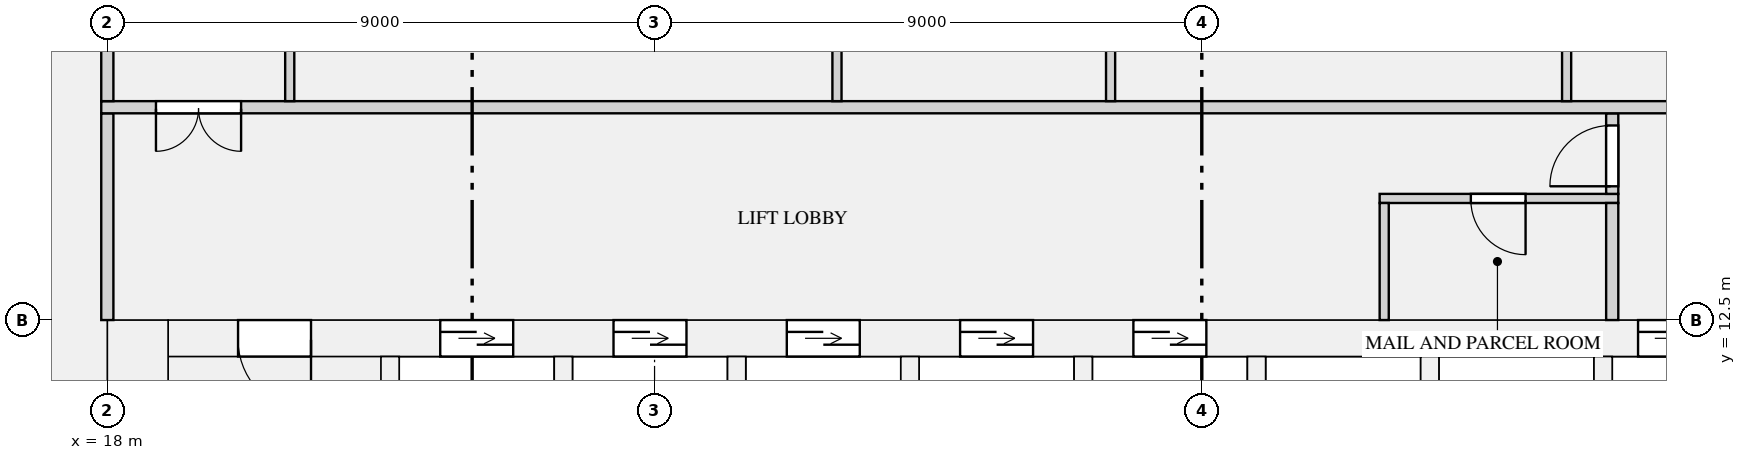
"""IFC4 building model, lengths in metres.
Left out: names, types, materials, properties, quantities, classifications, styles, units other than length and angle.
Written with IfcOpenShell. Run it as: python <this file> out.ifc"""

import sys

from ifc_helpers import new_model, si_unit, direction, frame, frame_2d, origin, place, context, subcontext, project, spatial, rectangle, extrude, element, fill, save


model = new_model("IFC4")
c1 = context("Model", 3, precision=1e-05, world=origin(), true_north=direction((0.0, 1.0)))
c2 = subcontext(c1, "Body", "Model", "MODEL_VIEW")
j1 = project(units=[si_unit("LENGTHUNIT", "METRE"), si_unit("PLANEANGLEUNIT", "RADIAN")], contexts=[c1])
p1 = place(None, origin())
s1 = spatial("IfcSite", under=j1, at=p1, CompositionType="ELEMENT")
p2 = place(p1, origin())
s2 = spatial("IfcBuilding", under=s1, at=p2, CompositionType="ELEMENT")
p3 = place(p2, frame((0.0, 0.0, 66.75)))
s3 = spatial("IfcBuildingStorey", under=s2, at=p3, CompositionType="ELEMENT", Elevation=66.75)
p4 = place(p3, frame((18.5, 0.0, 0.0), z_axis=(0.0, 0.0, 1.0), x_axis=(0.0, 1.0, 0.0)))
e1 = element("IfcWall", 1, at=p4, inside=s3, PredefinedType="SHEAR", context=c2, shape_type="SweptSolid", body=[
    extrude(rectangle(XDim=12.5, YDim=1.0, at=frame_2d((6.25, 0.0))), origin(), (0.0, 0.0, 1.0), 3.15),
])
p5 = place(p3, frame((19.0, 12.2, 0.0), z_axis=(0.0, 0.0, 1.0), x_axis=(1.0, 0.0, 0.0)))
e2 = element("IfcWall", 2, at=p5, inside=s3, PredefinedType="SHEAR", context=c2, shape_type="SweptSolid", body=[
    extrude(rectangle(XDim=34.0, YDim=0.6, at=frame_2d((17.0, 0.0))), origin(), (0.0, 0.0, 1.0), 3.15),
])
p6 = place(p5, frame((4.475, 0.0, 0.0)))
e3 = element("IfcOpeningElement", 3, at=p6, cuts=e2, PredefinedType="OPENING", context=c2, shape_type="SweptSolid", body=[
    extrude(rectangle(XDim=1.2, YDim=2.1, at=frame_2d((0.6, 1.05))), frame((0.0, 0.31, 0.0), z_axis=(0.0, -1.0, 0.0), x_axis=(1.0, 0.0, 0.0)), (0.0, 0.0, 1.0), 0.62),
])
p7 = place(p5, frame((7.325, 0.0, 0.0)))
e4 = element("IfcOpeningElement", 4, at=p7, cuts=e2, PredefinedType="OPENING", context=c2, shape_type="SweptSolid", body=[
    extrude(rectangle(XDim=1.2, YDim=2.1, at=frame_2d((0.6, 1.05))), frame((0.0, 0.31, 0.0), z_axis=(0.0, -1.0, 0.0), x_axis=(1.0, 0.0, 0.0)), (0.0, 0.0, 1.0), 0.62),
])
p8 = place(p5, frame((10.175, 0.0, 0.0)))
e5 = element("IfcOpeningElement", 5, at=p8, cuts=e2, PredefinedType="OPENING", context=c2, shape_type="SweptSolid", body=[
    extrude(rectangle(XDim=1.2, YDim=2.1, at=frame_2d((0.6, 1.05))), frame((0.0, 0.31, 0.0), z_axis=(0.0, -1.0, 0.0), x_axis=(1.0, 0.0, 0.0)), (0.0, 0.0, 1.0), 0.62),
])
p9 = place(p5, frame((13.025, 0.0, 0.0)))
e6 = element("IfcOpeningElement", 6, at=p9, cuts=e2, PredefinedType="OPENING", context=c2, shape_type="SweptSolid", body=[
    extrude(rectangle(XDim=1.2, YDim=2.1, at=frame_2d((0.6, 1.05))), frame((0.0, 0.31, 0.0), z_axis=(0.0, -1.0, 0.0), x_axis=(1.0, 0.0, 0.0)), (0.0, 0.0, 1.0), 0.62),
])
p10 = place(p5, frame((15.875, 0.0, 0.0)))
e7 = element("IfcOpeningElement", 7, at=p10, cuts=e2, PredefinedType="OPENING", context=c2, shape_type="SweptSolid", body=[
    extrude(rectangle(XDim=1.2, YDim=2.1, at=frame_2d((0.6, 1.05))), frame((0.0, 0.31, 0.0), z_axis=(0.0, -1.0, 0.0), x_axis=(1.0, 0.0, 0.0)), (0.0, 0.0, 1.0), 0.62),
])
p11 = place(p5, frame((24.175, 0.0, 0.0)))
e8 = element("IfcOpeningElement", 8, at=p11, cuts=e2, PredefinedType="OPENING", context=c2, shape_type="SweptSolid", body=[
    extrude(rectangle(XDim=1.1, YDim=2.1, at=frame_2d((0.55, 1.05))), frame((0.0, 0.31, 0.0), z_axis=(0.0, -1.0, 0.0), x_axis=(1.0, 0.0, 0.0)), (0.0, 0.0, 1.0), 0.62),
])
p12 = place(p5, frame((26.425, 0.0, 0.0)))
e9 = element("IfcOpeningElement", 9, at=p12, cuts=e2, PredefinedType="OPENING", context=c2, shape_type="SweptSolid", body=[
    extrude(rectangle(XDim=1.1, YDim=2.1, at=frame_2d((0.55, 1.05))), frame((0.0, 0.31, 0.0), z_axis=(0.0, -1.0, 0.0), x_axis=(1.0, 0.0, 0.0)), (0.0, 0.0, 1.0), 0.62),
])
p13 = place(p5, frame((28.675, 0.0, 0.0)))
e10 = element("IfcOpeningElement", 10, at=p13, cuts=e2, PredefinedType="OPENING", context=c2, shape_type="SweptSolid", body=[
    extrude(rectangle(XDim=1.1, YDim=2.1, at=frame_2d((0.55, 1.05))), frame((0.0, 0.31, 0.0), z_axis=(0.0, -1.0, 0.0), x_axis=(1.0, 0.0, 0.0)), (0.0, 0.0, 1.0), 0.62),
])
p14 = place(p5, frame((1.15, 0.0, 0.0)))
e11 = element("IfcOpeningElement", 11, at=p14, cuts=e2, PredefinedType="OPENING", context=c2, shape_type="SweptSolid", body=[
    extrude(rectangle(XDim=1.2, YDim=2.1, at=frame_2d((0.6, 1.05))), frame((0.0, 0.31, 0.0), z_axis=(0.0, -1.0, 0.0), x_axis=(1.0, 0.0, 0.0)), (0.0, 0.0, 1.0), 0.62),
])
p15 = place(p5, frame((31.65, 0.0, 0.0)))
e12 = element("IfcOpeningElement", 12, at=p15, cuts=e2, PredefinedType="OPENING", context=c2, shape_type="SweptSolid", body=[
    extrude(rectangle(XDim=1.2, YDim=2.1, at=frame_2d((0.6, 1.05))), frame((0.0, 0.31, 0.0), z_axis=(0.0, -1.0, 0.0), x_axis=(1.0, 0.0, 0.0)), (0.0, 0.0, 1.0), 0.62),
])
for number, where, z_axis, x_axis in (
    (13, (22.65, 9.35, 0.0), (0.0, 0.0, 1.0), (0.0, 1.0, 0.0)),
    (14, (25.5, 9.35, 0.0), (0.0, 0.0, 1.0), (0.0, 1.0, 0.0)),
    (15, (28.35, 9.35, 0.0), (0.0, 0.0, 1.0), (0.0, 1.0, 0.0)),
    (16, (31.2, 9.35, 0.0), (0.0, 0.0, 1.0), (0.0, 1.0, 0.0)),
    (17, (34.05, 9.35, 0.0), (0.0, 0.0, 1.0), (0.0, 1.0, 0.0)),
    (18, (36.9, 9.35, 0.0), (0.0, 0.0, 1.0), (0.0, 1.0, 0.0)),
    (19, (39.75, 9.35, 0.0), (0.0, 0.0, 1.0), (0.0, 1.0, 0.0)),
):
    element("IfcWall", number, at=place(p3, frame(where, z_axis=z_axis, x_axis=x_axis)), inside=s3, PredefinedType="SHEAR", context=c2, shape_type="SweptSolid", body=[
        extrude(rectangle(XDim=2.55, YDim=0.3, at=frame_2d((1.275, 0.0))), origin(), (0.0, 0.0, 1.0), 3.15),
    ])
p16 = place(p3, frame((42.6, 8.25, 0.0), z_axis=(0.0, 0.0, 1.0), x_axis=(0.0, 1.0, 0.0)))
e20 = element("IfcWall", 20, at=p16, inside=s3, PredefinedType="SHEAR", context=c2, shape_type="SweptSolid", body=[
    extrude(rectangle(XDim=3.65, YDim=0.3, at=frame_2d((1.825, 0.0))), origin(), (0.0, 0.0, 1.0), 3.15),
])
p17 = place(p3, frame((38.925, 14.5, 0.0), z_axis=(0.0, 0.0, 1.0), x_axis=(1.0, 0.0, 0.0)))
e21 = element("IfcWall", 21, at=p17, inside=s3, PredefinedType="PARTITIONING", context=c2, shape_type="SweptSolid", body=[
    extrude(rectangle(XDim=3.925, YDim=0.15, at=frame_2d((1.962, 0.0))), origin(), (0.0, 0.0, 1.0), 2.83),
])
p18 = place(p17, frame((1.5, 0.0, 0.0)))
e22 = element("IfcOpeningElement", 22, at=p18, cuts=e21, PredefinedType="OPENING", context=c2, shape_type="SweptSolid", body=[
    extrude(rectangle(XDim=0.9, YDim=2.1, at=frame_2d((0.45, 1.05))), frame((0.0, 0.085, 0.0), z_axis=(0.0, -1.0, 0.0), x_axis=(1.0, 0.0, 0.0)), (0.0, 0.0, 1.0), 0.17),
])
p19 = place(p3, frame((18.0, 12.5, 0.0), z_axis=(0.0, 0.0, 1.0), x_axis=(0.0, 1.0, 0.0)))
e23 = element("IfcWall", 23, at=p19, inside=s3, PredefinedType="PARTITIONING", context=c2, shape_type="SweptSolid", body=[
    extrude(rectangle(XDim=3.4, YDim=0.2, at=frame_2d((1.7, 0.0))), origin(), (0.0, 0.0, 1.0), 2.83),
])
p20 = place(p3, frame((39.0, 12.5, 0.0), z_axis=(0.0, 0.0, 1.0), x_axis=(0.0, 1.0, 0.0)))
e24 = element("IfcWall", 24, at=p20, inside=s3, PredefinedType="PARTITIONING", context=c2, shape_type="SweptSolid", body=[
    extrude(rectangle(XDim=1.925, YDim=0.15, at=frame_2d((0.962, 0.0))), origin(), (0.0, 0.0, 1.0), 2.83),
])
p21 = place(p3, frame((42.75, 12.5, 0.0), z_axis=(0.0, 0.0, 1.0), x_axis=(0.0, 1.0, 0.0)))
e25 = element("IfcWall", 25, at=p21, inside=s3, PredefinedType="PARTITIONING", context=c2, shape_type="SweptSolid", body=[
    extrude(rectangle(XDim=1.925, YDim=0.2, at=frame_2d((0.962, 0.0))), origin(), (0.0, 0.0, 1.0), 2.83),
])
p22 = place(p3, frame((42.75, 14.575, 0.0), z_axis=(0.0, 0.0, 1.0), x_axis=(0.0, 1.0, 0.0)))
e26 = element("IfcWall", 26, at=p22, inside=s3, PredefinedType="PARTITIONING", context=c2, shape_type="SweptSolid", body=[
    extrude(rectangle(XDim=1.325, YDim=0.2, at=frame_2d((0.663, 0.0))), origin(), (0.0, 0.0, 1.0), 2.83),
])
p23 = place(p22, frame((0.125, 0.0, 0.0)))
e27 = element("IfcOpeningElement", 27, at=p23, cuts=e26, PredefinedType="OPENING", context=c2, shape_type="SweptSolid", body=[
    extrude(rectangle(XDim=1.0, YDim=2.1, at=frame_2d((0.5, 1.05))), frame((0.0, 0.11, 0.0), z_axis=(0.0, -1.0, 0.0), x_axis=(1.0, 0.0, 0.0)), (0.0, 0.0, 1.0), 0.22),
])
p24 = place(p3, frame((17.9, 16.0, 0.0), z_axis=(0.0, 0.0, 1.0), x_axis=(1.0, 0.0, 0.0)))
e28 = element("IfcWall", 28, at=p24, inside=s3, PredefinedType="PARTITIONING", context=c2, shape_type="SweptSolid", body=[
    extrude(rectangle(XDim=36.2, YDim=0.2, at=frame_2d((18.1, 0.0))), origin(), (0.0, 0.0, 1.0), 2.83),
])
p25 = place(p24, frame((0.9, 0.0, 0.0)))
e29 = element("IfcOpeningElement", 29, at=p25, cuts=e28, PredefinedType="OPENING", context=c2, shape_type="SweptSolid", body=[
    extrude(rectangle(XDim=1.4, YDim=2.1, at=frame_2d((0.7, 1.05))), frame((0.0, 0.11, 0.0), z_axis=(0.0, -1.0, 0.0), x_axis=(1.0, 0.0, 0.0)), (0.0, 0.0, 1.0), 0.22),
])
p26 = place(p24, frame((33.9, 0.0, 0.0)))
e30 = element("IfcOpeningElement", 30, at=p26, cuts=e28, PredefinedType="OPENING", context=c2, shape_type="SweptSolid", body=[
    extrude(rectangle(XDim=1.4, YDim=2.1, at=frame_2d((0.7, 1.05))), frame((0.0, 0.11, 0.0), z_axis=(0.0, -1.0, 0.0), x_axis=(1.0, 0.0, 0.0)), (0.0, 0.0, 1.0), 0.22),
])
p27 = place(p3, frame((18.0, 16.1, 0.0), z_axis=(0.0, 0.0, 1.0), x_axis=(0.0, 1.0, 0.0)))
e31 = element("IfcWall", 31, at=p27, inside=s3, PredefinedType="PARTITIONING", context=c2, shape_type="SweptSolid", body=[
    extrude(rectangle(XDim=7.8, YDim=0.2, at=frame_2d((3.9, 0.0))), origin(), (0.0, 0.0, 1.0), 2.83),
])
p28 = place(p27, frame((2.35, 0.0, 0.0)))
e32 = element("IfcOpeningElement", 32, at=p28, cuts=e31, PredefinedType="OPENING", context=c2, shape_type="SweptSolid", body=[
    extrude(rectangle(XDim=1.1, YDim=2.1, at=frame_2d((0.55, 1.05))), frame((0.0, 0.11, 0.0), z_axis=(0.0, -1.0, 0.0), x_axis=(1.0, 0.0, 0.0)), (0.0, 0.0, 1.0), 0.22),
])
for number, where, z_axis, x_axis in (
    (33, (21.0, 16.1, 0.0), (0.0, 0.0, 1.0), (0.0, 1.0, 0.0)),
    (34, (30.0, 16.1, 0.0), (0.0, 0.0, 1.0), (0.0, 1.0, 0.0)),
    (35, (34.5, 16.1, 0.0), (0.0, 0.0, 1.0), (0.0, 1.0, 0.0)),
    (36, (42.0, 16.1, 0.0), (0.0, 0.0, 1.0), (0.0, 1.0, 0.0)),
):
    element("IfcWall", number, at=place(p3, frame(where, z_axis=z_axis, x_axis=x_axis)), inside=s3, PredefinedType="PARTITIONING", context=c2, shape_type="SweptSolid", body=[
        extrude(rectangle(XDim=4.825, YDim=0.15, at=frame_2d((2.413, 0.0))), origin(), (0.0, 0.0, 1.0), 2.83),
    ])
p29 = place(p6, origin())
e37 = element("IfcDoor", 37, at=p29, inside=s3, OperationType="DOUBLE_DOOR_SLIDING", PredefinedType="DOOR", context=c2, shape_type="SweptSolid", body=[
    extrude(rectangle(XDim=1.2, YDim=2.1, at=frame_2d((0.6, 1.05))), frame((0.0, 0.025, 0.0), z_axis=(0.0, -1.0, 0.0), x_axis=(1.0, 0.0, 0.0)), (0.0, 0.0, 1.0), 0.05),
])
fill(e3, e37)
p30 = place(p7, origin())
e38 = element("IfcDoor", 38, at=p30, inside=s3, OperationType="DOUBLE_DOOR_SLIDING", PredefinedType="DOOR", context=c2, shape_type="SweptSolid", body=[
    extrude(rectangle(XDim=1.2, YDim=2.1, at=frame_2d((0.6, 1.05))), frame((0.0, 0.025, 0.0), z_axis=(0.0, -1.0, 0.0), x_axis=(1.0, 0.0, 0.0)), (0.0, 0.0, 1.0), 0.05),
])
fill(e4, e38)
p31 = place(p8, origin())
e39 = element("IfcDoor", 39, at=p31, inside=s3, OperationType="DOUBLE_DOOR_SLIDING", PredefinedType="DOOR", context=c2, shape_type="SweptSolid", body=[
    extrude(rectangle(XDim=1.2, YDim=2.1, at=frame_2d((0.6, 1.05))), frame((0.0, 0.025, 0.0), z_axis=(0.0, -1.0, 0.0), x_axis=(1.0, 0.0, 0.0)), (0.0, 0.0, 1.0), 0.05),
])
fill(e5, e39)
p32 = place(p9, origin())
e40 = element("IfcDoor", 40, at=p32, inside=s3, OperationType="DOUBLE_DOOR_SLIDING", PredefinedType="DOOR", context=c2, shape_type="SweptSolid", body=[
    extrude(rectangle(XDim=1.2, YDim=2.1, at=frame_2d((0.6, 1.05))), frame((0.0, 0.025, 0.0), z_axis=(0.0, -1.0, 0.0), x_axis=(1.0, 0.0, 0.0)), (0.0, 0.0, 1.0), 0.05),
])
fill(e6, e40)
p33 = place(p10, origin())
e41 = element("IfcDoor", 41, at=p33, inside=s3, OperationType="DOUBLE_DOOR_SLIDING", PredefinedType="DOOR", context=c2, shape_type="SweptSolid", body=[
    extrude(rectangle(XDim=1.2, YDim=2.1, at=frame_2d((0.6, 1.05))), frame((0.0, 0.025, 0.0), z_axis=(0.0, -1.0, 0.0), x_axis=(1.0, 0.0, 0.0)), (0.0, 0.0, 1.0), 0.05),
])
fill(e7, e41)
p34 = place(p11, origin())
e42 = element("IfcDoor", 42, at=p34, inside=s3, OperationType="DOUBLE_DOOR_SLIDING", PredefinedType="DOOR", context=c2, shape_type="SweptSolid", body=[
    extrude(rectangle(XDim=1.1, YDim=2.1, at=frame_2d((0.55, 1.05))), frame((0.0, 0.025, 0.0), z_axis=(0.0, -1.0, 0.0), x_axis=(1.0, 0.0, 0.0)), (0.0, 0.0, 1.0), 0.05),
])
fill(e8, e42)
p35 = place(p18, frame((0.9, 0.0, 0.0), z_axis=(0.0, 0.0, 1.0), x_axis=(-1.0, 0.0, 0.0)))
e43 = element("IfcDoor", 43, at=p35, inside=s3, OperationType="SINGLE_SWING_LEFT", PredefinedType="DOOR", context=c2, shape_type="SweptSolid", body=[
    extrude(rectangle(XDim=0.9, YDim=2.1, at=frame_2d((0.45, 1.05))), frame((0.0, 0.025, 0.0), z_axis=(0.0, -1.0, 0.0), x_axis=(1.0, 0.0, 0.0)), (0.0, 0.0, 1.0), 0.05),
])
fill(e22, e43)
p36 = place(p14, frame((1.2, 0.0, 0.0), z_axis=(0.0, 0.0, 1.0), x_axis=(-1.0, 0.0, 0.0)))
e44 = element("IfcDoor", 44, at=p36, inside=s3, OperationType="SINGLE_SWING_LEFT", PredefinedType="DOOR", context=c2, shape_type="SweptSolid", body=[
    extrude(rectangle(XDim=1.2, YDim=2.1, at=frame_2d((0.6, 1.05))), frame((0.0, 0.025, 0.0), z_axis=(0.0, -1.0, 0.0), x_axis=(1.0, 0.0, 0.0)), (0.0, 0.0, 1.0), 0.05),
])
fill(e11, e44)
p37 = place(p23, origin())
e45 = element("IfcDoor", 45, at=p37, inside=s3, OperationType="SINGLE_SWING_LEFT", PredefinedType="DOOR", context=c2, shape_type="SweptSolid", body=[
    extrude(rectangle(XDim=1.0, YDim=2.1, at=frame_2d((0.5, 1.05))), frame((0.0, 0.025, 0.0), z_axis=(0.0, -1.0, 0.0), x_axis=(1.0, 0.0, 0.0)), (0.0, 0.0, 1.0), 0.05),
])
fill(e27, e45)
p38 = place(p25, frame((1.4, 0.0, 0.0), z_axis=(0.0, 0.0, 1.0), x_axis=(-1.0, 0.0, 0.0)))
e46 = element("IfcDoor", 46, at=p38, inside=s3, OperationType="DOUBLE_DOOR_SINGLE_SWING", PredefinedType="DOOR", context=c2, shape_type="SweptSolid", body=[
    extrude(rectangle(XDim=1.4, YDim=2.1, at=frame_2d((0.7, 1.05))), frame((0.0, 0.025, 0.0), z_axis=(0.0, -1.0, 0.0), x_axis=(1.0, 0.0, 0.0)), (0.0, 0.0, 1.0), 0.05),
])
fill(e29, e46)
save(model, sys.argv[1])
